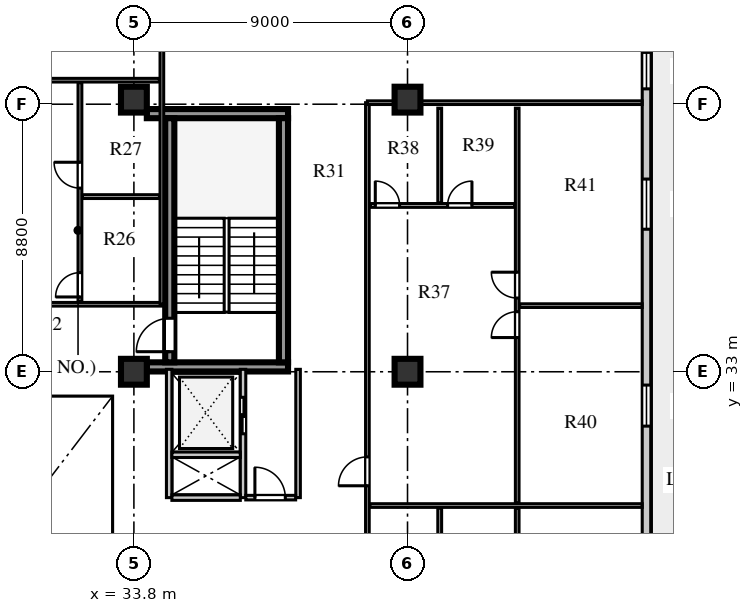
"""IFC4 building model, lengths in metres.
Left out: names, types, materials, properties, quantities, classifications, styles, units other than length and angle.
Written with IfcOpenShell. Run it as: python <this file> out.ifc"""

import sys

from ifc_helpers import new_model, si_unit, direction, frame, frame_2d, origin, origin_2d, place, context, subcontext, project, spatial, rectangle, extrude, element, fill, save


model = new_model("IFC4")
c1 = context("Model", 3, precision=1e-05, world=origin(), true_north=direction((0.0, 1.0)))
c2 = subcontext(c1, "Body", "Model", "MODEL_VIEW")
j1 = project(units=[si_unit("LENGTHUNIT", "METRE"), si_unit("PLANEANGLEUNIT", "RADIAN")], contexts=[c1])
p1 = place(None, origin())
s1 = spatial("IfcSite", under=j1, at=p1, CompositionType="ELEMENT")
p2 = place(p1, origin())
s2 = spatial("IfcBuilding", under=s1, at=p2, CompositionType="ELEMENT")
p3 = place(p2, frame((0.0, 0.0, 221.9)))
s3 = spatial("IfcBuildingStorey", under=s2, at=p3, CompositionType="ELEMENT", Elevation=221.9)
for number, where, z_axis, x_axis in (
    (1, (34.225, 33.16, 0.0), (0.0, 0.0, 1.0), (1.0, 0.0, 0.0)),
    (2, (34.225, 41.49, 0.0), (0.0, 0.0, 1.0), (1.0, 0.0, 0.0)),
):
    element("IfcWall", number, at=place(p3, frame(where, z_axis=z_axis, x_axis=x_axis)), inside=s3, PredefinedType="SHEAR", context=c2, shape_type="SweptSolid", body=[
        extrude(rectangle(XDim=4.645, YDim=0.3, at=frame_2d((2.323, 0.0))), origin(), (0.0, 0.0, 1.0), 3.66),
    ])
p4 = place(p3, frame((34.98, 33.31, 0.0), z_axis=(0.0, 0.0, 1.0), x_axis=(0.0, 1.0, 0.0)))
e3 = element("IfcWall", 3, at=p4, inside=s3, PredefinedType="SHEAR", context=c2, shape_type="SweptSolid", body=[
    extrude(rectangle(XDim=8.03, YDim=0.3, at=frame_2d((4.015, 0.0))), origin(), (0.0, 0.0, 1.0), 3.66),
])
p5 = place(p4, frame((0.35, 0.0, 0.0)))
e4 = element("IfcOpeningElement", 4, at=p5, cuts=e3, PredefinedType="OPENING", context=c2, shape_type="SweptSolid", body=[
    extrude(rectangle(XDim=1.1, YDim=2.1, at=frame_2d((0.55, 1.05))), frame((0.0, 0.16, 0.0), z_axis=(0.0, -1.0, 0.0), x_axis=(1.0, 0.0, 0.0)), (0.0, 0.0, 1.0), 0.32),
])
p6 = place(p3, frame((38.72, 33.31, 0.0), z_axis=(0.0, 0.0, 1.0), x_axis=(0.0, 1.0, 0.0)))
e5 = element("IfcWall", 5, at=p6, inside=s3, PredefinedType="SHEAR", context=c2, shape_type="SweptSolid", body=[
    extrude(rectangle(XDim=8.03, YDim=0.3, at=frame_2d((4.015, 0.0))), origin(), (0.0, 0.0, 1.0), 3.66),
])
for number, where, z_axis, x_axis in (
    (6, (33.8, 33.0, 0.0), (0.0, 0.0, 1.0), (1.0, 0.0, 0.0)),
    (7, (33.8, 41.95, 0.0), (0.0, 0.0, 1.0), (1.0, 0.0, 0.0)),
    (8, (42.8, 33.0, 0.0), (0.0, 0.0, 1.0), (1.0, 0.0, 0.0)),
    (9, (42.8, 41.95, 0.0), (0.0, 0.0, 1.0), (1.0, 0.0, 0.0)),
):
    element("IfcColumn", number, at=place(p3, frame(where, z_axis=z_axis, x_axis=x_axis)), inside=s3, PredefinedType="COLUMN", context=c2, shape_type="SweptSolid", body=[
        extrude(rectangle(XDim=0.85, YDim=0.85, at=origin_2d()), origin(), (0.0, 0.0, 1.0), 3.66),
    ])
p7 = place(p3, frame((50.66, 13.13, 0.0), z_axis=(0.0, 0.0, 1.0), x_axis=(0.0, 1.0, 0.0)))
e10 = element("IfcWall", 10, at=p7, inside=s3, PredefinedType="STANDARD", context=c2, shape_type="SweptSolid", body=[
    extrude(rectangle(XDim=30.94, YDim=0.28, at=frame_2d((15.47, 0.0))), origin(), (0.0, 0.0, 1.0), 3.66),
])
p8 = place(p7, frame((0.67, 0.0, 0.0)))
e11 = element("IfcOpeningElement", 11, at=p8, cuts=e10, PredefinedType="OPENING", context=c2, shape_type="SweptSolid", body=[
    extrude(rectangle(XDim=1.0, YDim=2.05, at=frame_2d((0.5, 1.025))), frame((0.0, 0.15, 0.0), z_axis=(0.0, -1.0, 0.0), x_axis=(1.0, 0.0, 0.0)), (0.0, 0.0, 1.0), 0.3),
])
p9 = place(p7, frame((3.88, 0.0, 0.8)))
e12 = element("IfcOpeningElement", 12, at=p9, cuts=e10, PredefinedType="OPENING", context=c2, shape_type="SweptSolid", body=[
    extrude(rectangle(XDim=2.4, YDim=2.05, at=frame_2d((1.2, 1.025))), frame((0.0, 0.15, 0.0), z_axis=(0.0, -1.0, 0.0), x_axis=(1.0, 0.0, 0.0)), (0.0, 0.0, 1.0), 0.3),
])
p10 = place(p7, frame((10.655, 0.0, 0.8)))
e13 = element("IfcOpeningElement", 13, at=p10, cuts=e10, PredefinedType="OPENING", context=c2, shape_type="SweptSolid", body=[
    extrude(rectangle(XDim=2.1, YDim=1.95, at=frame_2d((1.05, 0.975))), frame((0.0, 0.15, 0.0), z_axis=(0.0, -1.0, 0.0), x_axis=(1.0, 0.0, 0.0)), (0.0, 0.0, 1.0), 0.3),
])
p11 = place(p7, frame((18.082, 0.0, 0.8)))
e14 = element("IfcOpeningElement", 14, at=p11, cuts=e10, PredefinedType="OPENING", context=c2, shape_type="SweptSolid", body=[
    extrude(rectangle(XDim=1.35, YDim=1.9, at=frame_2d((0.675, 0.95))), frame((0.0, 0.15, 0.0), z_axis=(0.0, -1.0, 0.0), x_axis=(1.0, 0.0, 0.0)), (0.0, 0.0, 1.0), 0.3),
])
p12 = place(p7, frame((24.558, 0.0, 0.8)))
e15 = element("IfcOpeningElement", 15, at=p12, cuts=e10, PredefinedType="OPENING", context=c2, shape_type="SweptSolid", body=[
    extrude(rectangle(XDim=1.65, YDim=1.95, at=frame_2d((0.825, 0.975))), frame((0.0, 0.15, 0.0), z_axis=(0.0, -1.0, 0.0), x_axis=(1.0, 0.0, 0.0)), (0.0, 0.0, 1.0), 0.3),
])
p13 = place(p7, frame((29.175, 0.0, 0.8)))
e16 = element("IfcOpeningElement", 16, at=p13, cuts=e10, PredefinedType="OPENING", context=c2, shape_type="SweptSolid", body=[
    extrude(rectangle(XDim=1.2, YDim=1.75, at=frame_2d((0.6, 0.875))), frame((0.0, 0.15, 0.0), z_axis=(0.0, -1.0, 0.0), x_axis=(1.0, 0.0, 0.0)), (0.0, 0.0, 1.0), 0.3),
])
p14 = place(p3, frame((34.96, 28.86, 0.0), z_axis=(0.0, 0.0, 1.0), x_axis=(0.0, 1.0, 0.0)))
e17 = element("IfcWall", 17, at=p14, inside=s3, PredefinedType="SOLIDWALL", context=c2, shape_type="SweptSolid", body=[
    extrude(rectangle(XDim=4.22, YDim=0.18, at=frame_2d((2.11, 0.0))), origin(), (0.0, 0.0, 1.0), 3.66),
])
p15 = place(p3, frame((37.39, 28.86, 0.0), z_axis=(0.0, 0.0, 1.0), x_axis=(0.0, 1.0, 0.0)))
e18 = element("IfcWall", 18, at=p15, inside=s3, PredefinedType="SOLIDWALL", context=c2, shape_type="SweptSolid", body=[
    extrude(rectangle(XDim=4.22, YDim=0.18, at=frame_2d((2.11, 0.0))), origin(), (0.0, 0.0, 1.0), 3.66),
])
p16 = place(p15, frame((2.1, 0.0, 0.0)))
e19 = element("IfcOpeningElement", 19, at=p16, cuts=e18, PredefinedType="OPENING", context=c2, shape_type="SweptSolid", body=[
    extrude(rectangle(XDim=1.2, YDim=2.12, at=frame_2d((0.6, 1.06))), frame((0.0, 0.1, 0.0), z_axis=(0.0, -1.0, 0.0), x_axis=(1.0, 0.0, 0.0)), (0.0, 0.0, 1.0), 0.2),
])
for number, where, z_axis, x_axis in (
    (20, (35.05, 28.86, 0.0), (0.0, 0.0, 1.0), (1.0, 0.0, 0.0)),
    (21, (35.05, 30.27, 0.0), (0.0, 0.0, 1.0), (1.0, 0.0, 0.0)),
):
    element("IfcWall", number, at=place(p3, frame(where, z_axis=z_axis, x_axis=x_axis)), inside=s3, PredefinedType="SOLIDWALL", context=c2, shape_type="SweptSolid", body=[
        extrude(rectangle(XDim=2.25, YDim=0.18, at=frame_2d((1.125, 0.0))), origin(), (0.0, 0.0, 1.0), 3.66),
    ])
p17 = place(p3, frame((39.2, 28.86, 0.0), z_axis=(0.0, 0.0, 1.0), x_axis=(0.0, 1.0, 0.0)))
e22 = element("IfcWall", 22, at=p17, inside=s3, PredefinedType="PARTITIONING", context=c2, shape_type="SweptSolid", body=[
    extrude(rectangle(XDim=4.22, YDim=0.15, at=frame_2d((2.11, 0.0))), origin(), (0.0, 0.0, 1.0), 3.66),
])
p18 = place(p3, frame((37.48, 28.86, 0.0), z_axis=(0.0, 0.0, 1.0), x_axis=(1.0, 0.0, 0.0)))
e23 = element("IfcWall", 23, at=p18, inside=s3, PredefinedType="PARTITIONING", context=c2, shape_type="SweptSolid", body=[
    extrude(rectangle(XDim=1.64, YDim=0.15, at=frame_2d((0.82, 0.0))), origin(), (0.0, 0.0, 1.0), 3.66),
])
p19 = place(p18, frame((0.3, 0.0, 0.0)))
e24 = element("IfcOpeningElement", 24, at=p19, cuts=e23, PredefinedType="OPENING", context=c2, shape_type="SweptSolid", body=[
    extrude(rectangle(XDim=1.0, YDim=2.1, at=frame_2d((0.5, 1.05))), frame((0.0, 0.085, 0.0), z_axis=(0.0, -1.0, 0.0), x_axis=(1.0, 0.0, 0.0)), (0.0, 0.0, 1.0), 0.17),
])
p20 = place(p3, frame((25.22, 35.22, 0.0), z_axis=(0.0, 0.0, 1.0), x_axis=(1.0, 0.0, 0.0)))
e25 = element("IfcWall", 25, at=p20, inside=s3, PredefinedType="PARTITIONING", context=c2, shape_type="SweptSolid", body=[
    extrude(rectangle(XDim=9.5, YDim=0.12, at=frame_2d((4.75, 0.0))), origin(), (0.0, 0.0, 1.0), 3.66),
])
p21 = place(p20, frame((1.1, 0.0, 0.0)))
e26 = element("IfcOpeningElement", 26, at=p21, cuts=e25, PredefinedType="OPENING", context=c2, shape_type="SweptSolid", body=[
    extrude(rectangle(XDim=0.95, YDim=2.1, at=frame_2d((0.475, 1.05))), frame((0.0, 0.07, 0.0), z_axis=(0.0, -1.0, 0.0), x_axis=(1.0, 0.0, 0.0)), (0.0, 0.0, 1.0), 0.14),
])
p22 = place(p3, frame((34.72, 35.22, 0.0), z_axis=(0.0, 0.0, 1.0), x_axis=(0.0, 1.0, 0.0)))
e27 = element("IfcWall", 27, at=p22, inside=s3, PredefinedType="PARTITIONING", context=c2, shape_type="SweptSolid", body=[
    extrude(rectangle(XDim=14.1, YDim=0.12, at=frame_2d((7.05, 0.0))), origin(), (0.0, 0.0, 1.0), 3.66),
])
p23 = place(p3, frame((25.3, 42.59, 0.0), z_axis=(0.0, 0.0, 1.0), x_axis=(1.0, 0.0, 0.0)))
e28 = element("IfcWall", 28, at=p23, inside=s3, PredefinedType="PARTITIONING", context=c2, shape_type="SweptSolid", body=[
    extrude(rectangle(XDim=9.34, YDim=0.12, at=frame_2d((4.67, 0.0))), origin(), (0.0, 0.0, 1.0), 3.66),
])
p24 = place(p23, frame((0.6, 0.0, 0.0)))
e29 = element("IfcOpeningElement", 29, at=p24, cuts=e28, PredefinedType="OPENING", context=c2, shape_type="SweptSolid", body=[
    extrude(rectangle(XDim=0.85, YDim=2.08, at=frame_2d((0.425, 1.04))), frame((0.0, 0.07, 0.0), z_axis=(0.0, -1.0, 0.0), x_axis=(1.0, 0.0, 0.0)), (0.0, 0.0, 1.0), 0.14),
])
p25 = place(p23, frame((3.573, 0.0, 0.0)))
e30 = element("IfcOpeningElement", 30, at=p25, cuts=e28, PredefinedType="OPENING", context=c2, shape_type="SweptSolid", body=[
    extrude(rectangle(XDim=0.85, YDim=2.08, at=frame_2d((0.425, 1.04))), frame((0.0, 0.07, 0.0), z_axis=(0.0, -1.0, 0.0), x_axis=(1.0, 0.0, 0.0)), (0.0, 0.0, 1.0), 0.14),
])
p26 = place(p3, frame((32.025, 35.3, 0.0), z_axis=(0.0, 0.0, 1.0), x_axis=(0.0, 1.0, 0.0)))
e31 = element("IfcWall", 31, at=p26, inside=s3, PredefinedType="PLUMBINGWALL", context=c2, shape_type="SweptSolid", body=[
    extrude(rectangle(XDim=7.21, YDim=0.125, at=frame_2d((3.605, 0.0))), origin(), (0.0, 0.0, 1.0), 3.66),
])
p27 = place(p26, frame((0.16, 0.0, 0.0)))
e32 = element("IfcOpeningElement", 32, at=p27, cuts=e31, PredefinedType="OPENING", context=c2, shape_type="SweptSolid", body=[
    extrude(rectangle(XDim=0.8, YDim=2.05, at=frame_2d((0.4, 1.025))), frame((0.0, 0.073, 0.0), z_axis=(0.0, -1.0, 0.0), x_axis=(1.0, 0.0, 0.0)), (0.0, 0.0, 1.0), 0.145),
])
p28 = place(p26, frame((3.741, 0.0, 0.0)))
e33 = element("IfcOpeningElement", 33, at=p28, cuts=e31, PredefinedType="OPENING", context=c2, shape_type="SweptSolid", body=[
    extrude(rectangle(XDim=0.85, YDim=2.08, at=frame_2d((0.425, 1.04))), frame((0.0, 0.073, 0.0), z_axis=(0.0, -1.0, 0.0), x_axis=(1.0, 0.0, 0.0)), (0.0, 0.0, 1.0), 0.145),
])
p29 = place(p3, frame((32.105, 38.761, 0.0), z_axis=(0.0, 0.0, 1.0), x_axis=(1.0, 0.0, 0.0)))
e34 = element("IfcWall", 34, at=p29, inside=s3, PredefinedType="PLUMBINGWALL", context=c2, shape_type="SweptSolid", body=[
    extrude(rectangle(XDim=2.535, YDim=0.125, at=frame_2d((1.268, 0.0))), origin(), (0.0, 0.0, 1.0), 3.66),
])
p30 = place(p3, frame((41.48, 15.35, 0.0), z_axis=(0.0, 0.0, 1.0), x_axis=(0.0, 1.0, 0.0)))
e35 = element("IfcWall", 35, at=p30, inside=s3, PredefinedType="PARTITIONING", context=c2, shape_type="SweptSolid", body=[
    extrude(rectangle(XDim=26.5, YDim=0.12, at=frame_2d((13.25, 0.0))), origin(), (0.0, 0.0, 1.0), 3.66),
])
p31 = place(p30, frame((0.75, 0.0, 0.0)))
e36 = element("IfcOpeningElement", 36, at=p31, cuts=e35, PredefinedType="OPENING", context=c2, shape_type="SweptSolid", body=[
    extrude(rectangle(XDim=0.95, YDim=2.1, at=frame_2d((0.475, 1.05))), frame((0.0, 0.07, 0.0), z_axis=(0.0, -1.0, 0.0), x_axis=(1.0, 0.0, 0.0)), (0.0, 0.0, 1.0), 0.14),
])
p32 = place(p30, frame((13.9, 0.0, 0.0)))
e37 = element("IfcOpeningElement", 37, at=p32, cuts=e35, PredefinedType="OPENING", context=c2, shape_type="SweptSolid", body=[
    extrude(rectangle(XDim=0.95, YDim=2.1, at=frame_2d((0.475, 1.05))), frame((0.0, 0.07, 0.0), z_axis=(0.0, -1.0, 0.0), x_axis=(1.0, 0.0, 0.0)), (0.0, 0.0, 1.0), 0.14),
])
p33 = place(p3, frame((41.48, 41.85, 0.0), z_axis=(0.0, 0.0, 1.0), x_axis=(1.0, 0.0, 0.0)))
e38 = element("IfcWall", 38, at=p33, inside=s3, PredefinedType="PARTITIONING", context=c2, shape_type="SweptSolid", body=[
    extrude(rectangle(XDim=9.04, YDim=0.12, at=frame_2d((4.52, 0.0))), origin(), (0.0, 0.0, 1.0), 3.06),
])
p34 = place(p3, frame((46.408, 15.53, 0.0), z_axis=(0.0, 0.0, 1.0), x_axis=(0.0, 1.0, 0.0)))
e39 = element("IfcWall", 39, at=p34, inside=s3, PredefinedType="PARTITIONING", context=c2, shape_type="SweptSolid", body=[
    extrude(rectangle(XDim=12.99, YDim=0.12, at=frame_2d((6.495, 0.0))), origin(), (0.0, 0.0, 1.0), 3.66),
])
p35 = place(p34, frame((4.49, 0.0, 0.0)))
e40 = element("IfcOpeningElement", 40, at=p35, cuts=e39, PredefinedType="OPENING", context=c2, shape_type="SweptSolid", body=[
    extrude(rectangle(XDim=0.85, YDim=2.08, at=frame_2d((0.425, 1.04))), frame((0.0, 0.07, 0.0), z_axis=(0.0, -1.0, 0.0), x_axis=(1.0, 0.0, 0.0)), (0.0, 0.0, 1.0), 0.14),
])
p36 = place(p34, frame((5.79, 0.0, 0.0)))
e41 = element("IfcOpeningElement", 41, at=p36, cuts=e39, PredefinedType="OPENING", context=c2, shape_type="SweptSolid", body=[
    extrude(rectangle(XDim=0.85, YDim=2.08, at=frame_2d((0.425, 1.04))), frame((0.0, 0.07, 0.0), z_axis=(0.0, -1.0, 0.0), x_axis=(1.0, 0.0, 0.0)), (0.0, 0.0, 1.0), 0.14),
])
p37 = place(p3, frame((43.859, 22.48, 0.0), z_axis=(0.0, 0.0, 1.0), x_axis=(0.0, 1.0, 0.0)))
e42 = element("IfcWall", 42, at=p37, inside=s3, PredefinedType="PLUMBINGWALL", context=c2, shape_type="SweptSolid", body=[
    extrude(rectangle(XDim=6.04, YDim=0.125, at=frame_2d((3.02, 0.0))), origin(), (0.0, 0.0, 1.0), 3.66),
])
p38 = place(p3, frame((41.56, 28.6, 0.0), z_axis=(0.0, 0.0, 1.0), x_axis=(1.0, 0.0, 0.0)))
e43 = element("IfcWall", 43, at=p38, inside=s3, PredefinedType="PARTITIONING", context=c2, shape_type="SweptSolid", body=[
    extrude(rectangle(XDim=8.96, YDim=0.12, at=frame_2d((4.48, 0.0))), origin(), (0.0, 0.0, 1.0), 3.66),
])
p39 = place(p3, frame((46.408, 28.68, 0.0), z_axis=(0.0, 0.0, 1.0), x_axis=(0.0, 1.0, 0.0)))
e44 = element("IfcWall", 44, at=p39, inside=s3, PredefinedType="PARTITIONING", context=c2, shape_type="SweptSolid", body=[
    extrude(rectangle(XDim=12.99, YDim=0.12, at=frame_2d((6.495, 0.0))), origin(), (0.0, 0.0, 1.0), 3.66),
])
p40 = place(p39, frame((5.445, 0.0, 0.0)))
e45 = element("IfcOpeningElement", 45, at=p40, cuts=e44, PredefinedType="OPENING", context=c2, shape_type="SweptSolid", body=[
    extrude(rectangle(XDim=0.85, YDim=2.08, at=frame_2d((0.425, 1.04))), frame((0.0, 0.07, 0.0), z_axis=(0.0, -1.0, 0.0), x_axis=(1.0, 0.0, 0.0)), (0.0, 0.0, 1.0), 0.14),
])
p41 = place(p39, frame((6.745, 0.0, 0.0)))
e46 = element("IfcOpeningElement", 46, at=p41, cuts=e44, PredefinedType="OPENING", context=c2, shape_type="SweptSolid", body=[
    extrude(rectangle(XDim=0.85, YDim=2.08, at=frame_2d((0.425, 1.04))), frame((0.0, 0.07, 0.0), z_axis=(0.0, -1.0, 0.0), x_axis=(1.0, 0.0, 0.0)), (0.0, 0.0, 1.0), 0.14),
])
p42 = place(p3, frame((41.58, 38.47, 0.0), z_axis=(0.0, 0.0, 1.0), x_axis=(1.0, 0.0, 0.0)))
e47 = element("IfcWall", 47, at=p42, inside=s3, PredefinedType="PLUMBINGWALL", context=c2, shape_type="SweptSolid", body=[
    extrude(rectangle(XDim=4.748, YDim=0.125, at=frame_2d((2.374, 0.0))), origin(), (0.0, 0.0, 1.0), 3.66),
])
p43 = place(p42, frame((0.16, 0.0, 0.0)))
e48 = element("IfcOpeningElement", 48, at=p43, cuts=e47, PredefinedType="OPENING", context=c2, shape_type="SweptSolid", body=[
    extrude(rectangle(XDim=0.8, YDim=2.05, at=frame_2d((0.4, 1.025))), frame((0.0, 0.073, 0.0), z_axis=(0.0, -1.0, 0.0), x_axis=(1.0, 0.0, 0.0)), (0.0, 0.0, 1.0), 0.145),
])
p44 = place(p42, frame((2.539, 0.0, 0.0)))
e49 = element("IfcOpeningElement", 49, at=p44, cuts=e47, PredefinedType="OPENING", context=c2, shape_type="SweptSolid", body=[
    extrude(rectangle(XDim=0.8, YDim=2.05, at=frame_2d((0.4, 1.025))), frame((0.0, 0.073, 0.0), z_axis=(0.0, -1.0, 0.0), x_axis=(1.0, 0.0, 0.0)), (0.0, 0.0, 1.0), 0.145),
])
p45 = place(p3, frame((43.859, 38.55, 0.0), z_axis=(0.0, 0.0, 1.0), x_axis=(0.0, 1.0, 0.0)))
e50 = element("IfcWall", 50, at=p45, inside=s3, PredefinedType="PLUMBINGWALL", context=c2, shape_type="SweptSolid", body=[
    extrude(rectangle(XDim=3.12, YDim=0.125, at=frame_2d((1.56, 0.0))), origin(), (0.0, 0.0, 1.0), 3.66),
])
p46 = place(p3, frame((46.488, 35.175, 0.0), z_axis=(0.0, 0.0, 1.0), x_axis=(1.0, 0.0, 0.0)))
e51 = element("IfcWall", 51, at=p46, inside=s3, PredefinedType="PARTITIONING", context=c2, shape_type="SweptSolid", body=[
    extrude(rectangle(XDim=4.032, YDim=0.12, at=frame_2d((2.016, 0.0))), origin(), (0.0, 0.0, 1.0), 3.66),
])
p47 = place(p11, origin())
e52 = element("IfcWindow", 52, at=p47, inside=s3, PartitioningType="SINGLE_PANEL", PredefinedType="WINDOW", context=c2, shape_type="SweptSolid", body=[
    extrude(rectangle(XDim=1.35, YDim=1.9, at=frame_2d((0.675, 0.95))), frame((0.0, 0.03, 0.0), z_axis=(0.0, -1.0, 0.0), x_axis=(1.0, 0.0, 0.0)), (0.0, 0.0, 1.0), 0.06),
])
fill(e14, e52)
p48 = place(p12, origin())
e53 = element("IfcWindow", 53, at=p48, inside=s3, PartitioningType="SINGLE_PANEL", PredefinedType="WINDOW", context=c2, shape_type="SweptSolid", body=[
    extrude(rectangle(XDim=1.65, YDim=1.95, at=frame_2d((0.825, 0.975))), frame((0.0, 0.03, 0.0), z_axis=(0.0, -1.0, 0.0), x_axis=(1.0, 0.0, 0.0)), (0.0, 0.0, 1.0), 0.06),
])
fill(e15, e53)
p49 = place(p13, origin())
e54 = element("IfcWindow", 54, at=p49, inside=s3, PartitioningType="SINGLE_PANEL", PredefinedType="WINDOW", context=c2, shape_type="SweptSolid", body=[
    extrude(rectangle(XDim=1.2, YDim=1.75, at=frame_2d((0.6, 0.875))), frame((0.0, 0.03, 0.0), z_axis=(0.0, -1.0, 0.0), x_axis=(1.0, 0.0, 0.0)), (0.0, 0.0, 1.0), 0.06),
])
fill(e16, e54)
p50 = place(p5, origin())
e55 = element("IfcDoor", 55, at=p50, inside=s3, OperationType="SINGLE_SWING_LEFT", PredefinedType="DOOR", context=c2, shape_type="SweptSolid", body=[
    extrude(rectangle(XDim=1.1, YDim=2.1, at=frame_2d((0.55, 1.05))), frame((0.0, 0.025, 0.0), z_axis=(0.0, -1.0, 0.0), x_axis=(1.0, 0.0, 0.0)), (0.0, 0.0, 1.0), 0.05),
])
fill(e4, e55)
p51 = place(p16, frame((1.2, 0.0, 0.0), z_axis=(0.0, 0.0, 1.0), x_axis=(-1.0, 0.0, 0.0)))
e56 = element("IfcDoor", 56, at=p51, inside=s3, OperationType="DOUBLE_DOOR_SLIDING", PredefinedType="DOOR", context=c2, shape_type="SweptSolid", body=[
    extrude(rectangle(XDim=1.2, YDim=2.12, at=frame_2d((0.6, 1.06))), frame((0.0, 0.025, 0.0), z_axis=(0.0, -1.0, 0.0), x_axis=(1.0, 0.0, 0.0)), (0.0, 0.0, 1.0), 0.05),
])
fill(e19, e56)
p52 = place(p19, origin())
e57 = element("IfcDoor", 57, at=p52, inside=s3, OperationType="SINGLE_SWING_LEFT", PredefinedType="DOOR", context=c2, shape_type="SweptSolid", body=[
    extrude(rectangle(XDim=1.0, YDim=2.1, at=frame_2d((0.5, 1.05))), frame((0.0, 0.025, 0.0), z_axis=(0.0, -1.0, 0.0), x_axis=(1.0, 0.0, 0.0)), (0.0, 0.0, 1.0), 0.05),
])
fill(e24, e57)
p53 = place(p27, origin())
e58 = element("IfcDoor", 58, at=p53, inside=s3, OperationType="SINGLE_SWING_LEFT", PredefinedType="DOOR", context=c2, shape_type="SweptSolid", body=[
    extrude(rectangle(XDim=0.8, YDim=2.05, at=frame_2d((0.4, 1.025))), frame((0.0, 0.025, 0.0), z_axis=(0.0, -1.0, 0.0), x_axis=(1.0, 0.0, 0.0)), (0.0, 0.0, 1.0), 0.05),
])
fill(e32, e58)
p54 = place(p28, origin())
e59 = element("IfcDoor", 59, at=p54, inside=s3, OperationType="SINGLE_SWING_RIGHT", PredefinedType="DOOR", context=c2, shape_type="SweptSolid", body=[
    extrude(rectangle(XDim=0.85, YDim=2.08, at=frame_2d((0.425, 1.04))), frame((0.0, 0.025, 0.0), z_axis=(0.0, -1.0, 0.0), x_axis=(1.0, 0.0, 0.0)), (0.0, 0.0, 1.0), 0.05),
])
fill(e33, e59)
p55 = place(p43, origin())
e60 = element("IfcDoor", 60, at=p55, inside=s3, OperationType="SINGLE_SWING_LEFT", PredefinedType="DOOR", context=c2, shape_type="SweptSolid", body=[
    extrude(rectangle(XDim=0.8, YDim=2.05, at=frame_2d((0.4, 1.025))), frame((0.0, 0.025, 0.0), z_axis=(0.0, -1.0, 0.0), x_axis=(1.0, 0.0, 0.0)), (0.0, 0.0, 1.0), 0.05),
])
fill(e48, e60)
p56 = place(p44, origin())
e61 = element("IfcDoor", 61, at=p56, inside=s3, OperationType="SINGLE_SWING_RIGHT", PredefinedType="DOOR", context=c2, shape_type="SweptSolid", body=[
    extrude(rectangle(XDim=0.8, YDim=2.05, at=frame_2d((0.4, 1.025))), frame((0.0, 0.025, 0.0), z_axis=(0.0, -1.0, 0.0), x_axis=(1.0, 0.0, 0.0)), (0.0, 0.0, 1.0), 0.05),
])
fill(e49, e61)
p57 = place(p40, origin())
e62 = element("IfcDoor", 62, at=p57, inside=s3, OperationType="SINGLE_SWING_LEFT", PredefinedType="DOOR", context=c2, shape_type="SweptSolid", body=[
    extrude(rectangle(XDim=0.85, YDim=2.08, at=frame_2d((0.425, 1.04))), frame((0.0, 0.025, 0.0), z_axis=(0.0, -1.0, 0.0), x_axis=(1.0, 0.0, 0.0)), (0.0, 0.0, 1.0), 0.05),
])
fill(e45, e62)
p58 = place(p41, origin())
e63 = element("IfcDoor", 63, at=p58, inside=s3, OperationType="SINGLE_SWING_RIGHT", PredefinedType="DOOR", context=c2, shape_type="SweptSolid", body=[
    extrude(rectangle(XDim=0.85, YDim=2.08, at=frame_2d((0.425, 1.04))), frame((0.0, 0.025, 0.0), z_axis=(0.0, -1.0, 0.0), x_axis=(1.0, 0.0, 0.0)), (0.0, 0.0, 1.0), 0.05),
])
fill(e46, e63)
p59 = place(p32, origin())
e64 = element("IfcDoor", 64, at=p59, inside=s3, OperationType="SINGLE_SWING_LEFT", PredefinedType="DOOR", context=c2, shape_type="SweptSolid", body=[
    extrude(rectangle(XDim=0.95, YDim=2.1, at=frame_2d((0.475, 1.05))), frame((0.0, 0.025, 0.0), z_axis=(0.0, -1.0, 0.0), x_axis=(1.0, 0.0, 0.0)), (0.0, 0.0, 1.0), 0.05),
])
fill(e37, e64)
save(model, sys.argv[1])
